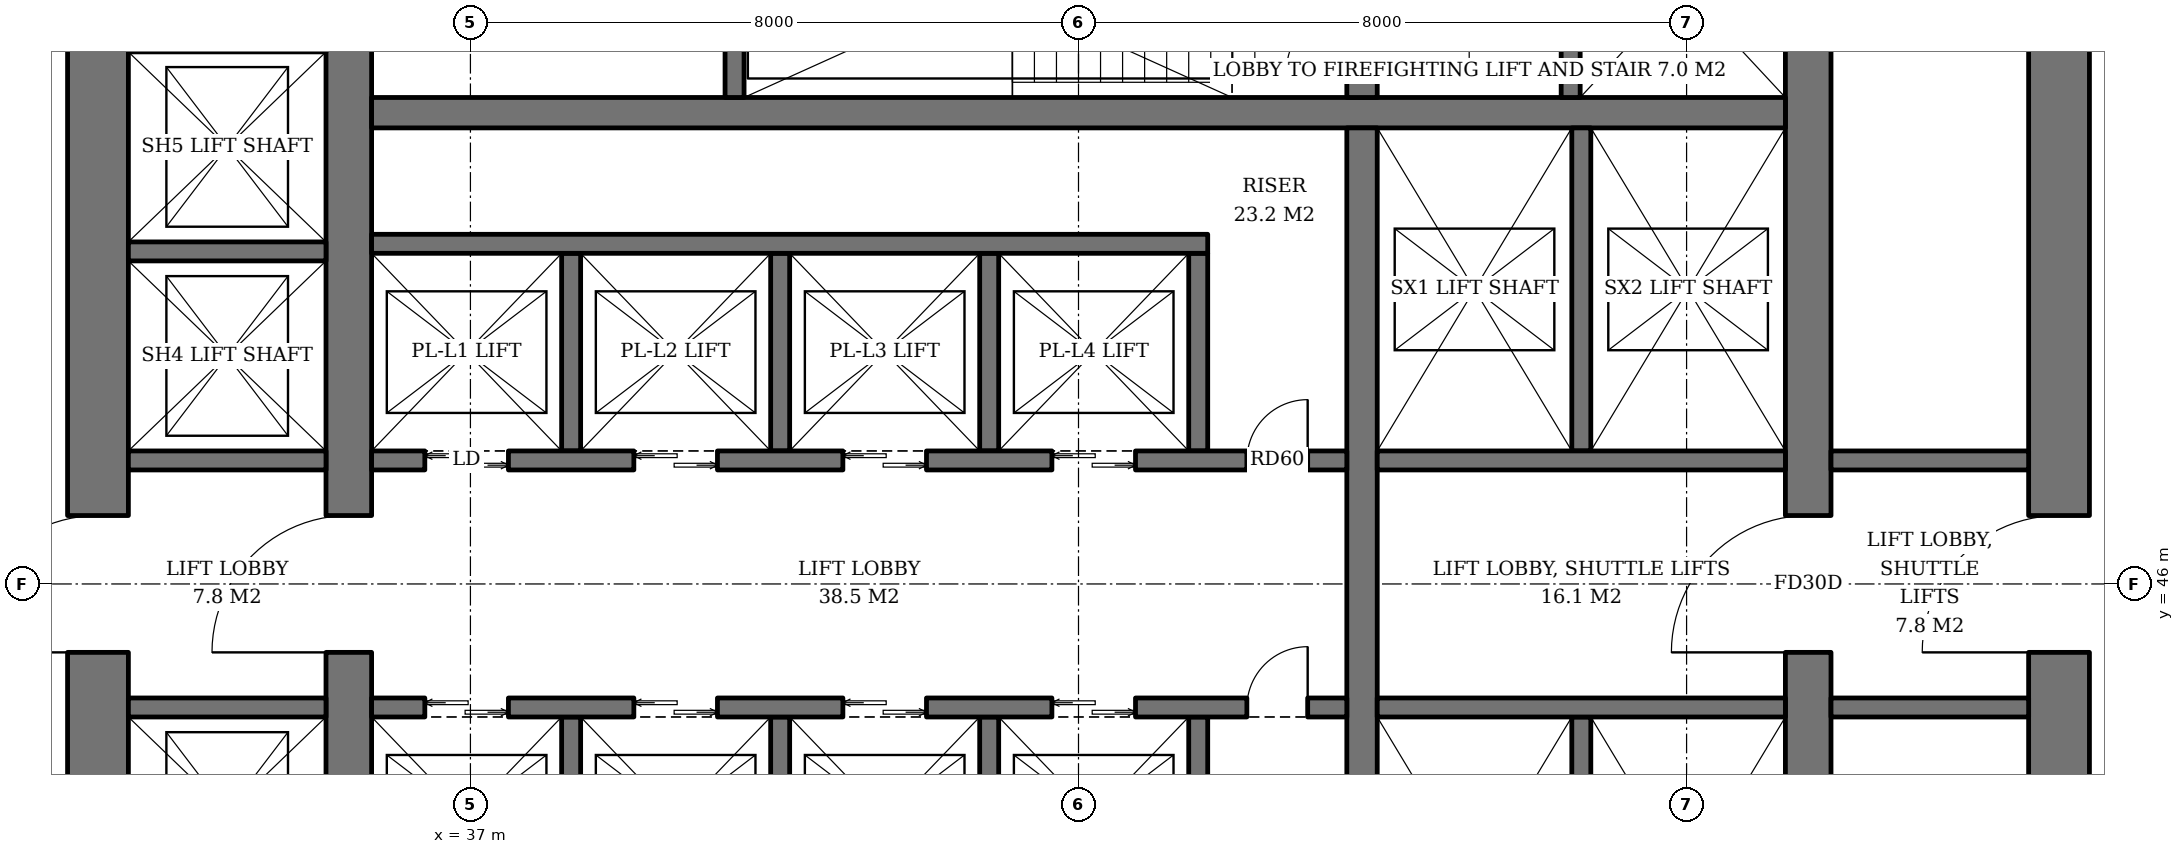
"""IFC4 building model, lengths in metres.
Left out: names, types, materials, properties, quantities, classifications, styles, units other than length and angle.
Written with IfcOpenShell. Run it as: python <this file> out.ifc"""

import sys

from ifc_helpers import new_model, si_unit, direction, frame, frame_2d, origin, place, context, subcontext, project, spatial, rectangle, extrude, element, fill, save


model = new_model("IFC4")
c1 = context("Model", 3, precision=1e-05, world=origin(), true_north=direction((0.0, 1.0)))
c2 = subcontext(c1, "Body", "Model", "MODEL_VIEW")
j1 = project(units=[si_unit("LENGTHUNIT", "METRE"), si_unit("PLANEANGLEUNIT", "RADIAN")], contexts=[c1])
p1 = place(None, origin())
s1 = spatial("IfcSite", under=j1, at=p1, CompositionType="ELEMENT")
p2 = place(p1, origin())
s2 = spatial("IfcBuilding", under=s1, at=p2, CompositionType="ELEMENT")
p3 = place(p2, frame((0.0, 0.0, 21.0)))
s3 = spatial("IfcBuildingStorey", under=s2, at=p3, CompositionType="ELEMENT", Elevation=21.0)
p4 = place(p3, frame((35.4, 36.7, 0.0), z_axis=(0.0, 0.0, 1.0), x_axis=(0.0, 1.0, 0.0)))
e1 = element("IfcWall", 1, at=p4, inside=s3, PredefinedType="SHEAR", context=c2, shape_type="SweptSolid", body=[
    extrude(rectangle(XDim=18.6, YDim=0.6, at=frame_2d((9.3, 0.0))), origin(), (0.0, 0.0, 1.0), 3.8),
])
p5 = place(p4, frame((8.4, 0.0, 0.0)))
e2 = element("IfcOpeningElement", 2, at=p5, cuts=e1, PredefinedType="OPENING", context=c2, shape_type="SweptSolid", body=[
    extrude(rectangle(XDim=1.8, YDim=2.4, at=frame_2d((0.9, 1.2))), frame((0.0, 0.31, 0.0), z_axis=(0.0, -1.0, 0.0), x_axis=(1.0, 0.0, 0.0)), (0.0, 0.0, 1.0), 0.62),
])
p6 = place(p3, frame((54.6, 36.7, 0.0), z_axis=(0.0, 0.0, 1.0), x_axis=(0.0, 1.0, 0.0)))
e3 = element("IfcWall", 3, at=p6, inside=s3, PredefinedType="SHEAR", context=c2, shape_type="SweptSolid", body=[
    extrude(rectangle(XDim=18.6, YDim=0.6, at=frame_2d((9.3, 0.0))), origin(), (0.0, 0.0, 1.0), 3.8),
])
p7 = place(p6, frame((8.4, 0.0, 0.0)))
e4 = element("IfcOpeningElement", 4, at=p7, cuts=e3, PredefinedType="OPENING", context=c2, shape_type="SweptSolid", body=[
    extrude(rectangle(XDim=1.8, YDim=2.4, at=frame_2d((0.9, 1.2))), frame((0.0, 0.31, 0.0), z_axis=(0.0, -1.0, 0.0), x_axis=(1.0, 0.0, 0.0)), (0.0, 0.0, 1.0), 0.62),
])
p8 = place(p3, frame((32.1, 33.5, 0.0), z_axis=(0.0, 0.0, 1.0), x_axis=(0.0, 1.0, 0.0)))
e5 = element("IfcWall", 5, at=p8, inside=s3, PredefinedType="SHEAR", context=c2, shape_type="SweptSolid", body=[
    extrude(rectangle(XDim=25.0, YDim=0.8, at=frame_2d((12.5, 0.0))), origin(), (0.0, 0.0, 1.0), 3.8),
])
p9 = place(p8, frame((11.6, 0.0, 0.0)))
e6 = element("IfcOpeningElement", 6, at=p9, cuts=e5, PredefinedType="OPENING", context=c2, shape_type="SweptSolid", body=[
    extrude(rectangle(XDim=1.8, YDim=2.4, at=frame_2d((0.9, 1.2))), frame((0.0, 0.41, 0.0), z_axis=(0.0, -1.0, 0.0), x_axis=(1.0, 0.0, 0.0)), (0.0, 0.0, 1.0), 0.82),
])
p10 = place(p3, frame((57.9, 33.5, 0.0), z_axis=(0.0, 0.0, 1.0), x_axis=(0.0, 1.0, 0.0)))
e7 = element("IfcWall", 7, at=p10, inside=s3, PredefinedType="SHEAR", context=c2, shape_type="SweptSolid", body=[
    extrude(rectangle(XDim=25.0, YDim=0.8, at=frame_2d((12.5, 0.0))), origin(), (0.0, 0.0, 1.0), 3.8),
])
p11 = place(p10, frame((11.6, 0.0, 0.0)))
e8 = element("IfcOpeningElement", 8, at=p11, cuts=e7, PredefinedType="OPENING", context=c2, shape_type="SweptSolid", body=[
    extrude(rectangle(XDim=1.8, YDim=2.4, at=frame_2d((0.9, 1.2))), frame((0.0, 0.41, 0.0), z_axis=(0.0, -1.0, 0.0), x_axis=(1.0, 0.0, 0.0)), (0.0, 0.0, 1.0), 0.82),
])
p12 = place(p3, frame((35.7, 52.2, 0.0), z_axis=(0.0, 0.0, 1.0), x_axis=(1.0, 0.0, 0.0)))
e9 = element("IfcWall", 9, at=p12, inside=s3, PredefinedType="SHEAR", context=c2, shape_type="SweptSolid", body=[
    extrude(rectangle(XDim=18.6, YDim=0.4, at=frame_2d((9.3, 0.0))), origin(), (0.0, 0.0, 1.0), 3.8),
])
p13 = place(p3, frame((48.73, 40.0, 0.0), z_axis=(0.0, 0.0, 1.0), x_axis=(0.0, 1.0, 0.0)))
e10 = element("IfcWall", 10, at=p13, inside=s3, PredefinedType="SHEAR", context=c2, shape_type="SweptSolid", body=[
    extrude(rectangle(XDim=12.0, YDim=0.4, at=frame_2d((6.0, 0.0))), origin(), (0.0, 0.0, 1.0), 3.8),
])
p14 = place(p3, frame((48.73, 52.4, 0.0), z_axis=(0.0, 0.0, 1.0), x_axis=(0.0, 1.0, 0.0)))
e11 = element("IfcWall", 11, at=p14, inside=s3, PredefinedType="SHEAR", context=c2, shape_type="SweptSolid", body=[
    extrude(rectangle(XDim=2.9, YDim=0.4, at=frame_2d((1.45, 0.0))), origin(), (0.0, 0.0, 1.0), 3.8),
])
p15 = place(p14, frame((0.3, 0.0, 0.0)))
e12 = element("IfcOpeningElement", 12, at=p15, cuts=e11, PredefinedType="OPENING", context=c2, shape_type="SweptSolid", body=[
    extrude(rectangle(XDim=1.0, YDim=2.1, at=frame_2d((0.5, 1.05))), frame((0.0, 0.21, 0.0), z_axis=(0.0, -1.0, 0.0), x_axis=(1.0, 0.0, 0.0)), (0.0, 0.0, 1.0), 0.42),
])
p16 = place(p3, frame((40.475, 52.4, 0.0), z_axis=(0.0, 0.0, 1.0), x_axis=(0.0, 1.0, 0.0)))
e13 = element("IfcWall", 13, at=p16, inside=s3, PredefinedType="SHEAR", context=c2, shape_type="SweptSolid", body=[
    extrude(rectangle(XDim=2.9, YDim=0.25, at=frame_2d((1.45, 0.0))), origin(), (0.0, 0.0, 1.0), 3.8),
])
p17 = place(p3, frame((51.475, 52.4, 0.0), z_axis=(0.0, 0.0, 1.0), x_axis=(0.0, 1.0, 0.0)))
e14 = element("IfcWall", 14, at=p17, inside=s3, PredefinedType="SHEAR", context=c2, shape_type="SweptSolid", body=[
    extrude(rectangle(XDim=2.9, YDim=0.25, at=frame_2d((1.45, 0.0))), origin(), (0.0, 0.0, 1.0), 3.8),
])
p18 = place(p17, frame((0.8, 0.0, 0.0)))
e15 = element("IfcOpeningElement", 15, at=p18, cuts=e14, PredefinedType="OPENING", context=c2, shape_type="SweptSolid", body=[
    extrude(rectangle(XDim=1.3, YDim=2.2, at=frame_2d((0.65, 1.1))), frame((0.0, 0.135, 0.0), z_axis=(0.0, -1.0, 0.0), x_axis=(1.0, 0.0, 0.0)), (0.0, 0.0, 1.0), 0.27),
])
for number, where, z_axis, x_axis in (
    (16, (38.325, 47.75, 0.0), (0.0, 0.0, 1.0), (0.0, 1.0, 0.0)),
    (17, (41.075, 47.75, 0.0), (0.0, 0.0, 1.0), (0.0, 1.0, 0.0)),
    (18, (43.825, 47.75, 0.0), (0.0, 0.0, 1.0), (0.0, 1.0, 0.0)),
    (19, (46.575, 47.75, 0.0), (0.0, 0.0, 1.0), (0.0, 1.0, 0.0)),
):
    element("IfcWall", number, at=place(p3, frame(where, z_axis=z_axis, x_axis=x_axis)), inside=s3, PredefinedType="SHEAR", context=c2, shape_type="SweptSolid", body=[
        extrude(rectangle(XDim=2.6, YDim=0.25, at=frame_2d((1.3, 0.0))), origin(), (0.0, 0.0, 1.0), 3.8),
    ])
p19 = place(p3, frame((35.7, 50.475, 0.0), z_axis=(0.0, 0.0, 1.0), x_axis=(1.0, 0.0, 0.0)))
e20 = element("IfcWall", 20, at=p19, inside=s3, PredefinedType="SHEAR", context=c2, shape_type="SweptSolid", body=[
    extrude(rectangle(XDim=11.0, YDim=0.25, at=frame_2d((5.5, 0.0))), origin(), (0.0, 0.0, 1.0), 3.8),
])
p20 = place(p3, frame((35.7, 47.625, 0.0), z_axis=(0.0, 0.0, 1.0), x_axis=(1.0, 0.0, 0.0)))
e21 = element("IfcWall", 21, at=p20, inside=s3, PredefinedType="SHEAR", context=c2, shape_type="SweptSolid", body=[
    extrude(rectangle(XDim=12.83, YDim=0.25, at=frame_2d((6.415, 0.0))), origin(), (0.0, 0.0, 1.0), 3.8),
])
p21 = place(p20, frame((0.7, 0.0, 0.0)))
e22 = element("IfcOpeningElement", 22, at=p21, cuts=e21, PredefinedType="OPENING", context=c2, shape_type="SweptSolid", body=[
    extrude(rectangle(XDim=1.1, YDim=2.2, at=frame_2d((0.55, 1.1))), frame((0.0, 0.135, 0.0), z_axis=(0.0, -1.0, 0.0), x_axis=(1.0, 0.0, 0.0)), (0.0, 0.0, 1.0), 0.27),
])
p22 = place(p20, frame((3.45, 0.0, 0.0)))
e23 = element("IfcOpeningElement", 23, at=p22, cuts=e21, PredefinedType="OPENING", context=c2, shape_type="SweptSolid", body=[
    extrude(rectangle(XDim=1.1, YDim=2.2, at=frame_2d((0.55, 1.1))), frame((0.0, 0.135, 0.0), z_axis=(0.0, -1.0, 0.0), x_axis=(1.0, 0.0, 0.0)), (0.0, 0.0, 1.0), 0.27),
])
p23 = place(p20, frame((6.2, 0.0, 0.0)))
e24 = element("IfcOpeningElement", 24, at=p23, cuts=e21, PredefinedType="OPENING", context=c2, shape_type="SweptSolid", body=[
    extrude(rectangle(XDim=1.1, YDim=2.2, at=frame_2d((0.55, 1.1))), frame((0.0, 0.135, 0.0), z_axis=(0.0, -1.0, 0.0), x_axis=(1.0, 0.0, 0.0)), (0.0, 0.0, 1.0), 0.27),
])
p24 = place(p20, frame((8.95, 0.0, 0.0)))
e25 = element("IfcOpeningElement", 25, at=p24, cuts=e21, PredefinedType="OPENING", context=c2, shape_type="SweptSolid", body=[
    extrude(rectangle(XDim=1.1, YDim=2.2, at=frame_2d((0.55, 1.1))), frame((0.0, 0.135, 0.0), z_axis=(0.0, -1.0, 0.0), x_axis=(1.0, 0.0, 0.0)), (0.0, 0.0, 1.0), 0.27),
])
p25 = place(p20, frame((11.515, 0.0, 0.0)))
e26 = element("IfcOpeningElement", 26, at=p25, cuts=e21, PredefinedType="OPENING", context=c2, shape_type="SweptSolid", body=[
    extrude(rectangle(XDim=0.8, YDim=2.0, at=frame_2d((0.4, 1.0))), frame((0.0, 0.135, 0.0), z_axis=(0.0, -1.0, 0.0), x_axis=(1.0, 0.0, 0.0)), (0.0, 0.0, 1.0), 0.27),
])
for number, where, z_axis, x_axis in (
    (27, (38.325, 44.25, 0.0), (0.0, 0.0, 1.0), (0.0, -1.0, 0.0)),
    (28, (41.075, 44.25, 0.0), (0.0, 0.0, 1.0), (0.0, -1.0, 0.0)),
    (29, (43.825, 44.25, 0.0), (0.0, 0.0, 1.0), (0.0, -1.0, 0.0)),
    (30, (46.575, 44.25, 0.0), (0.0, 0.0, 1.0), (0.0, -1.0, 0.0)),
):
    element("IfcWall", number, at=place(p3, frame(where, z_axis=z_axis, x_axis=x_axis)), inside=s3, PredefinedType="SHEAR", context=c2, shape_type="SweptSolid", body=[
        extrude(rectangle(XDim=2.6, YDim=0.25, at=frame_2d((1.3, 0.0))), origin(), (0.0, 0.0, 1.0), 3.8),
    ])
p26 = place(p3, frame((35.7, 44.375, 0.0), z_axis=(0.0, 0.0, 1.0), x_axis=(1.0, 0.0, 0.0)))
e31 = element("IfcWall", 31, at=p26, inside=s3, PredefinedType="SHEAR", context=c2, shape_type="SweptSolid", body=[
    extrude(rectangle(XDim=12.83, YDim=0.25, at=frame_2d((6.415, 0.0))), origin(), (0.0, 0.0, 1.0), 3.8),
])
p27 = place(p26, frame((0.7, 0.0, 0.0)))
e32 = element("IfcOpeningElement", 32, at=p27, cuts=e31, PredefinedType="OPENING", context=c2, shape_type="SweptSolid", body=[
    extrude(rectangle(XDim=1.1, YDim=2.2, at=frame_2d((0.55, 1.1))), frame((0.0, 0.135, 0.0), z_axis=(0.0, -1.0, 0.0), x_axis=(1.0, 0.0, 0.0)), (0.0, 0.0, 1.0), 0.27),
])
p28 = place(p26, frame((3.45, 0.0, 0.0)))
e33 = element("IfcOpeningElement", 33, at=p28, cuts=e31, PredefinedType="OPENING", context=c2, shape_type="SweptSolid", body=[
    extrude(rectangle(XDim=1.1, YDim=2.2, at=frame_2d((0.55, 1.1))), frame((0.0, 0.135, 0.0), z_axis=(0.0, -1.0, 0.0), x_axis=(1.0, 0.0, 0.0)), (0.0, 0.0, 1.0), 0.27),
])
p29 = place(p26, frame((6.2, 0.0, 0.0)))
e34 = element("IfcOpeningElement", 34, at=p29, cuts=e31, PredefinedType="OPENING", context=c2, shape_type="SweptSolid", body=[
    extrude(rectangle(XDim=1.1, YDim=2.2, at=frame_2d((0.55, 1.1))), frame((0.0, 0.135, 0.0), z_axis=(0.0, -1.0, 0.0), x_axis=(1.0, 0.0, 0.0)), (0.0, 0.0, 1.0), 0.27),
])
p30 = place(p26, frame((8.95, 0.0, 0.0)))
e35 = element("IfcOpeningElement", 35, at=p30, cuts=e31, PredefinedType="OPENING", context=c2, shape_type="SweptSolid", body=[
    extrude(rectangle(XDim=1.1, YDim=2.2, at=frame_2d((0.55, 1.1))), frame((0.0, 0.135, 0.0), z_axis=(0.0, -1.0, 0.0), x_axis=(1.0, 0.0, 0.0)), (0.0, 0.0, 1.0), 0.27),
])
p31 = place(p26, frame((11.515, 0.0, 0.0)))
e36 = element("IfcOpeningElement", 36, at=p31, cuts=e31, PredefinedType="OPENING", context=c2, shape_type="SweptSolid", body=[
    extrude(rectangle(XDim=0.8, YDim=2.0, at=frame_2d((0.4, 1.0))), frame((0.0, 0.135, 0.0), z_axis=(0.0, -1.0, 0.0), x_axis=(1.0, 0.0, 0.0)), (0.0, 0.0, 1.0), 0.27),
])
p32 = place(p3, frame((51.615, 47.75, 0.0), z_axis=(0.0, 0.0, 1.0), x_axis=(0.0, 1.0, 0.0)))
e37 = element("IfcWall", 37, at=p32, inside=s3, PredefinedType="SHEAR", context=c2, shape_type="SweptSolid", body=[
    extrude(rectangle(XDim=4.25, YDim=0.25, at=frame_2d((2.125, 0.0))), origin(), (0.0, 0.0, 1.0), 3.8),
])
p33 = place(p3, frame((48.93, 47.625, 0.0), z_axis=(0.0, 0.0, 1.0), x_axis=(1.0, 0.0, 0.0)))
e38 = element("IfcWall", 38, at=p33, inside=s3, PredefinedType="SHEAR", context=c2, shape_type="SweptSolid", body=[
    extrude(rectangle(XDim=5.37, YDim=0.25, at=frame_2d((2.685, 0.0))), origin(), (0.0, 0.0, 1.0), 3.8),
])
p34 = place(p3, frame((51.615, 44.25, 0.0), z_axis=(0.0, 0.0, 1.0), x_axis=(0.0, -1.0, 0.0)))
e39 = element("IfcWall", 39, at=p34, inside=s3, PredefinedType="SHEAR", context=c2, shape_type="SweptSolid", body=[
    extrude(rectangle(XDim=4.25, YDim=0.25, at=frame_2d((2.125, 0.0))), origin(), (0.0, 0.0, 1.0), 3.8),
])
p35 = place(p3, frame((48.93, 44.375, 0.0), z_axis=(0.0, 0.0, 1.0), x_axis=(1.0, 0.0, 0.0)))
e40 = element("IfcWall", 40, at=p35, inside=s3, PredefinedType="SHEAR", context=c2, shape_type="SweptSolid", body=[
    extrude(rectangle(XDim=5.37, YDim=0.25, at=frame_2d((2.685, 0.0))), origin(), (0.0, 0.0, 1.0), 3.8),
])
for number, where, z_axis, x_axis in (
    (41, (32.5, 44.375, 0.0), (0.0, 0.0, 1.0), (1.0, 0.0, 0.0)),
    (42, (32.5, 47.625, 0.0), (0.0, 0.0, 1.0), (1.0, 0.0, 0.0)),
    (43, (32.5, 50.375, 0.0), (0.0, 0.0, 1.0), (1.0, 0.0, 0.0)),
):
    element("IfcWall", number, at=place(p3, frame(where, z_axis=z_axis, x_axis=x_axis)), inside=s3, PredefinedType="SHEAR", context=c2, shape_type="SweptSolid", body=[
        extrude(rectangle(XDim=2.6, YDim=0.25, at=frame_2d((1.3, 0.0))), origin(), (0.0, 0.0, 1.0), 3.8),
    ])
for number, where, z_axis, x_axis in (
    (44, (54.9, 44.375, 0.0), (0.0, 0.0, 1.0), (1.0, 0.0, 0.0)),
    (45, (54.9, 47.625, 0.0), (0.0, 0.0, 1.0), (1.0, 0.0, 0.0)),
):
    element("IfcWall", number, at=place(p3, frame(where, z_axis=z_axis, x_axis=x_axis)), inside=s3, PredefinedType="SOLIDWALL", context=c2, shape_type="SweptSolid", body=[
        extrude(rectangle(XDim=2.6, YDim=0.25, at=frame_2d((1.3, 0.0))), origin(), (0.0, 0.0, 1.0), 3.62),
    ])
p36 = place(p21, origin())
e46 = element("IfcDoor", 46, at=p36, inside=s3, OperationType="DOUBLE_DOOR_SLIDING", PredefinedType="DOOR", context=c2, shape_type="SweptSolid", body=[
    extrude(rectangle(XDim=1.1, YDim=2.2, at=frame_2d((0.55, 1.1))), frame((0.0, 0.025, 0.0), z_axis=(0.0, -1.0, 0.0), x_axis=(1.0, 0.0, 0.0)), (0.0, 0.0, 1.0), 0.05),
])
fill(e22, e46)
p37 = place(p22, origin())
e47 = element("IfcDoor", 47, at=p37, inside=s3, OperationType="DOUBLE_DOOR_SLIDING", PredefinedType="DOOR", context=c2, shape_type="SweptSolid", body=[
    extrude(rectangle(XDim=1.1, YDim=2.2, at=frame_2d((0.55, 1.1))), frame((0.0, 0.025, 0.0), z_axis=(0.0, -1.0, 0.0), x_axis=(1.0, 0.0, 0.0)), (0.0, 0.0, 1.0), 0.05),
])
fill(e23, e47)
p38 = place(p23, origin())
e48 = element("IfcDoor", 48, at=p38, inside=s3, OperationType="DOUBLE_DOOR_SLIDING", PredefinedType="DOOR", context=c2, shape_type="SweptSolid", body=[
    extrude(rectangle(XDim=1.1, YDim=2.2, at=frame_2d((0.55, 1.1))), frame((0.0, 0.025, 0.0), z_axis=(0.0, -1.0, 0.0), x_axis=(1.0, 0.0, 0.0)), (0.0, 0.0, 1.0), 0.05),
])
fill(e24, e48)
p39 = place(p24, origin())
e49 = element("IfcDoor", 49, at=p39, inside=s3, OperationType="DOUBLE_DOOR_SLIDING", PredefinedType="DOOR", context=c2, shape_type="SweptSolid", body=[
    extrude(rectangle(XDim=1.1, YDim=2.2, at=frame_2d((0.55, 1.1))), frame((0.0, 0.025, 0.0), z_axis=(0.0, -1.0, 0.0), x_axis=(1.0, 0.0, 0.0)), (0.0, 0.0, 1.0), 0.05),
])
fill(e25, e49)
p40 = place(p25, origin())
e50 = element("IfcDoor", 50, at=p40, inside=s3, OperationType="SINGLE_SWING_RIGHT", PredefinedType="DOOR", context=c2, shape_type="SweptSolid", body=[
    extrude(rectangle(XDim=0.8, YDim=2.0, at=frame_2d((0.4, 1.0))), frame((0.0, 0.025, 0.0), z_axis=(0.0, -1.0, 0.0), x_axis=(1.0, 0.0, 0.0)), (0.0, 0.0, 1.0), 0.05),
])
fill(e26, e50)
p41 = place(p27, origin())
e51 = element("IfcDoor", 51, at=p41, inside=s3, OperationType="DOUBLE_DOOR_SLIDING", PredefinedType="DOOR", context=c2, shape_type="SweptSolid", body=[
    extrude(rectangle(XDim=1.1, YDim=2.2, at=frame_2d((0.55, 1.1))), frame((0.0, 0.025, 0.0), z_axis=(0.0, -1.0, 0.0), x_axis=(1.0, 0.0, 0.0)), (0.0, 0.0, 1.0), 0.05),
])
fill(e32, e51)
p42 = place(p28, origin())
e52 = element("IfcDoor", 52, at=p42, inside=s3, OperationType="DOUBLE_DOOR_SLIDING", PredefinedType="DOOR", context=c2, shape_type="SweptSolid", body=[
    extrude(rectangle(XDim=1.1, YDim=2.2, at=frame_2d((0.55, 1.1))), frame((0.0, 0.025, 0.0), z_axis=(0.0, -1.0, 0.0), x_axis=(1.0, 0.0, 0.0)), (0.0, 0.0, 1.0), 0.05),
])
fill(e33, e52)
p43 = place(p29, origin())
e53 = element("IfcDoor", 53, at=p43, inside=s3, OperationType="DOUBLE_DOOR_SLIDING", PredefinedType="DOOR", context=c2, shape_type="SweptSolid", body=[
    extrude(rectangle(XDim=1.1, YDim=2.2, at=frame_2d((0.55, 1.1))), frame((0.0, 0.025, 0.0), z_axis=(0.0, -1.0, 0.0), x_axis=(1.0, 0.0, 0.0)), (0.0, 0.0, 1.0), 0.05),
])
fill(e34, e53)
p44 = place(p30, origin())
e54 = element("IfcDoor", 54, at=p44, inside=s3, OperationType="DOUBLE_DOOR_SLIDING", PredefinedType="DOOR", context=c2, shape_type="SweptSolid", body=[
    extrude(rectangle(XDim=1.1, YDim=2.2, at=frame_2d((0.55, 1.1))), frame((0.0, 0.025, 0.0), z_axis=(0.0, -1.0, 0.0), x_axis=(1.0, 0.0, 0.0)), (0.0, 0.0, 1.0), 0.05),
])
fill(e35, e54)
p45 = place(p31, origin())
e55 = element("IfcDoor", 55, at=p45, inside=s3, OperationType="SINGLE_SWING_RIGHT", PredefinedType="DOOR", context=c2, shape_type="SweptSolid", body=[
    extrude(rectangle(XDim=0.8, YDim=2.0, at=frame_2d((0.4, 1.0))), frame((0.0, 0.025, 0.0), z_axis=(0.0, -1.0, 0.0), x_axis=(1.0, 0.0, 0.0)), (0.0, 0.0, 1.0), 0.05),
])
fill(e36, e55)
p46 = place(p15, origin())
e56 = element("IfcDoor", 56, at=p46, inside=s3, OperationType="SINGLE_SWING_LEFT", PredefinedType="DOOR", context=c2, shape_type="SweptSolid", body=[
    extrude(rectangle(XDim=1.0, YDim=2.1, at=frame_2d((0.5, 1.05))), frame((0.0, 0.025, 0.0), z_axis=(0.0, -1.0, 0.0), x_axis=(1.0, 0.0, 0.0)), (0.0, 0.0, 1.0), 0.05),
])
fill(e12, e56)
p47 = place(p5, origin())
e57 = element("IfcDoor", 57, at=p47, inside=s3, OperationType="DOUBLE_DOOR_SINGLE_SWING", PredefinedType="DOOR", context=c2, shape_type="SweptSolid", body=[
    extrude(rectangle(XDim=1.8, YDim=2.4, at=frame_2d((0.9, 1.2))), frame((0.0, 0.025, 0.0), z_axis=(0.0, -1.0, 0.0), x_axis=(1.0, 0.0, 0.0)), (0.0, 0.0, 1.0), 0.05),
])
fill(e2, e57)
p48 = place(p7, origin())
e58 = element("IfcDoor", 58, at=p48, inside=s3, OperationType="DOUBLE_DOOR_SINGLE_SWING", PredefinedType="DOOR", context=c2, shape_type="SweptSolid", body=[
    extrude(rectangle(XDim=1.8, YDim=2.4, at=frame_2d((0.9, 1.2))), frame((0.0, 0.025, 0.0), z_axis=(0.0, -1.0, 0.0), x_axis=(1.0, 0.0, 0.0)), (0.0, 0.0, 1.0), 0.05),
])
fill(e4, e58)
p49 = place(p9, origin())
e59 = element("IfcDoor", 59, at=p49, inside=s3, OperationType="DOUBLE_DOOR_SINGLE_SWING", PredefinedType="DOOR", context=c2, shape_type="SweptSolid", body=[
    extrude(rectangle(XDim=1.8, YDim=2.4, at=frame_2d((0.9, 1.2))), frame((0.0, 0.025, 0.0), z_axis=(0.0, -1.0, 0.0), x_axis=(1.0, 0.0, 0.0)), (0.0, 0.0, 1.0), 0.05),
])
fill(e6, e59)
p50 = place(p11, origin())
e60 = element("IfcDoor", 60, at=p50, inside=s3, OperationType="DOUBLE_DOOR_SINGLE_SWING", PredefinedType="DOOR", context=c2, shape_type="SweptSolid", body=[
    extrude(rectangle(XDim=1.8, YDim=2.4, at=frame_2d((0.9, 1.2))), frame((0.0, 0.025, 0.0), z_axis=(0.0, -1.0, 0.0), x_axis=(1.0, 0.0, 0.0)), (0.0, 0.0, 1.0), 0.05),
])
fill(e8, e60)
save(model, sys.argv[1])
